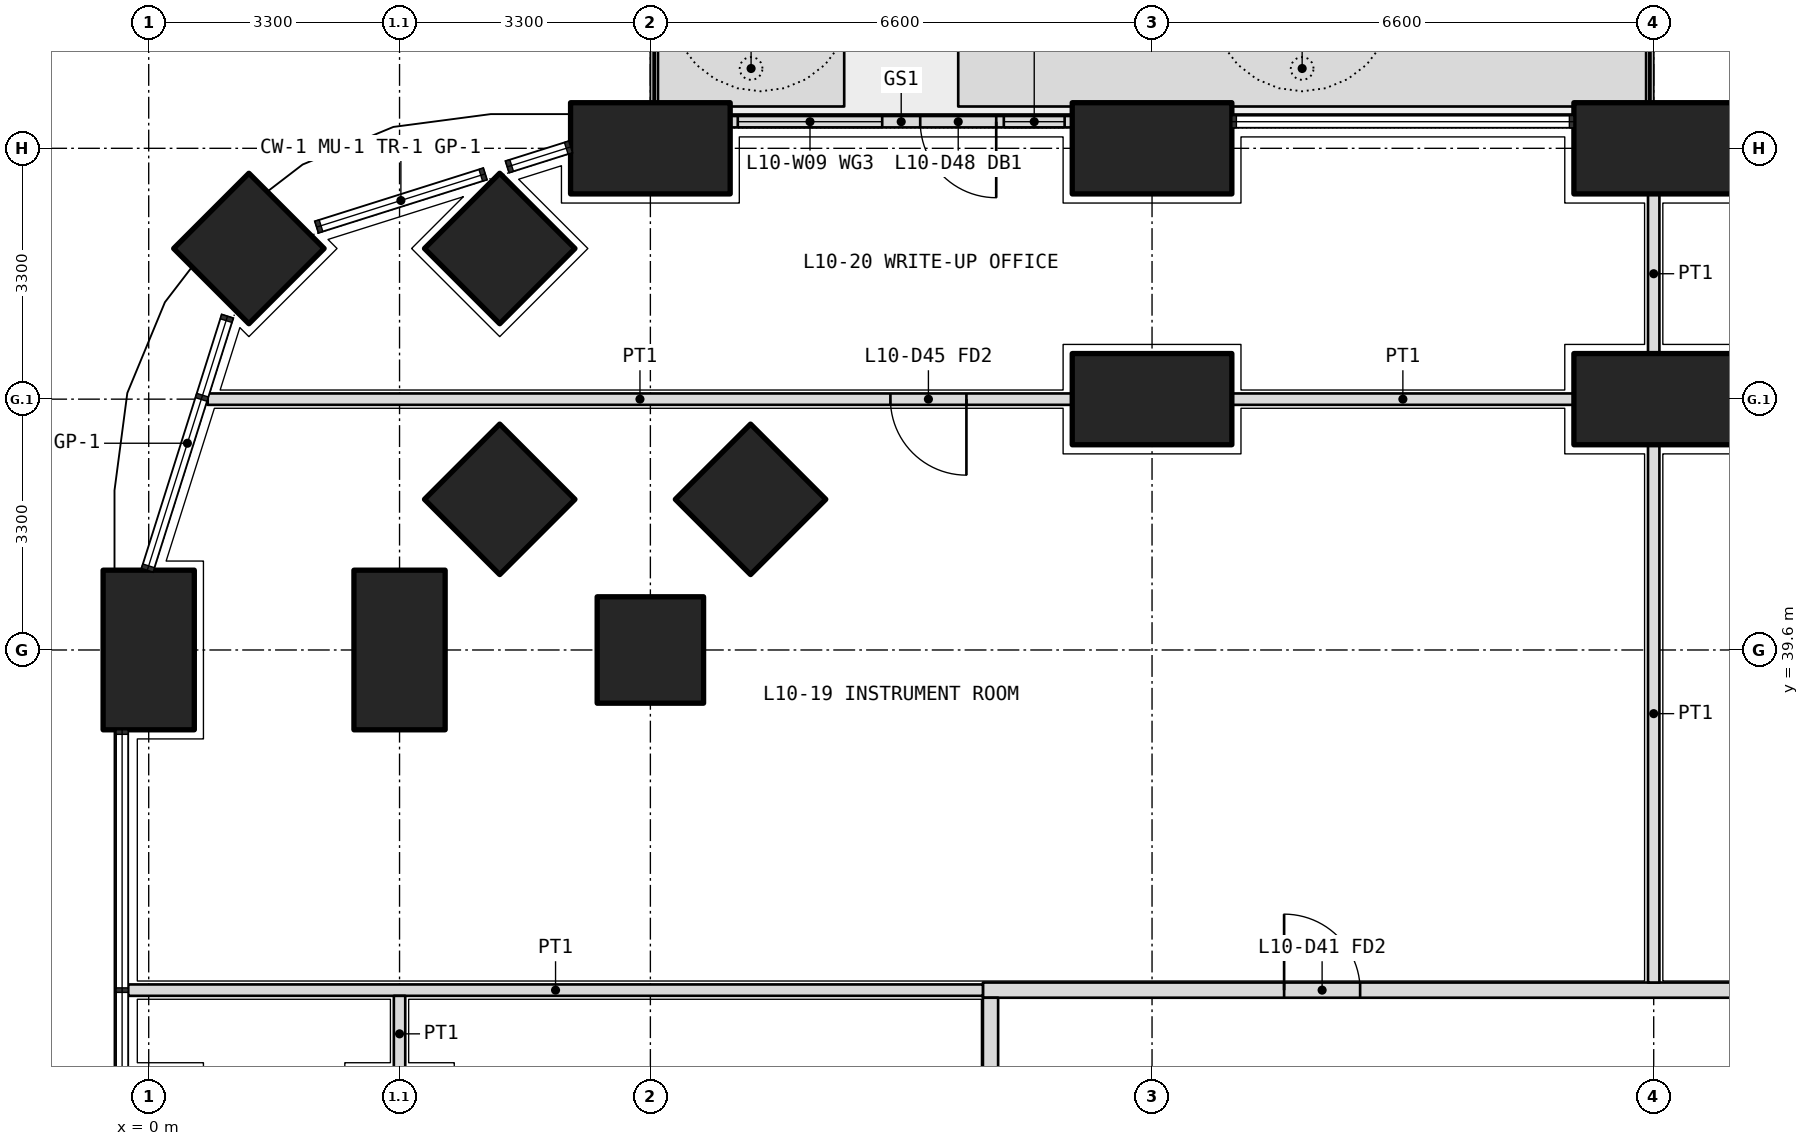
"""IFC4 building model, lengths in metres.
Left out: names, types, materials, properties, quantities, classifications, styles, units other than length and angle.
Written with IfcOpenShell. Run it as: python <this file> out.ifc"""

import sys

from ifc_helpers import new_model, si_unit, direction, frame, frame_2d, origin, origin_2d, place, context, subcontext, project, spatial, polyline, rectangle, outline, extrude, element, fill, save


model = new_model("IFC4")
c1 = context("Model", 3, precision=1e-05, world=origin(), true_north=direction((0.0, 1.0)))
c2 = subcontext(c1, "Body", "Model", "MODEL_VIEW")
j1 = project(units=[si_unit("LENGTHUNIT", "METRE"), si_unit("PLANEANGLEUNIT", "RADIAN")], contexts=[c1])
p1 = place(None, origin())
s1 = spatial("IfcSite", under=j1, at=p1, CompositionType="ELEMENT")
p2 = place(p1, origin())
s2 = spatial("IfcBuilding", under=s1, at=p2, CompositionType="ELEMENT")
p3 = place(p2, frame((0.0, 0.0, 46.5)))
s3 = spatial("IfcBuildingStorey", under=s2, at=p3, CompositionType="ELEMENT", Elevation=46.5)
p4 = place(p3, frame((1.318, 44.882, 0.0), z_axis=(0.0, 0.0, 1.0), x_axis=(0.707106781187, 0.707106781187, 0.0)))
e1 = element("IfcColumn", 1, at=p4, inside=s3, PredefinedType="COLUMN", context=c2, shape_type="SweptSolid", body=[
    extrude(rectangle(XDim=1.4, YDim=1.4, at=origin_2d()), origin(), (0.0, 0.0, 1.0), 4.2),
])
for number, where, z_axis, x_axis in (
    (2, (0.0, 39.6, 0.0), (0.0, 0.0, 1.0), (0.0, 1.0, 0.0)),
    (3, (6.6, 46.2, 0.0), (0.0, 0.0, 1.0), (1.0, 0.0, 0.0)),
    (4, (13.2, 46.2, 0.0), (0.0, 0.0, 1.0), (1.0, 0.0, 0.0)),
    (5, (19.8, 46.2, 0.0), (0.0, 0.0, 1.0), (1.0, 0.0, 0.0)),
):
    element("IfcColumn", number, at=place(p3, frame(where, z_axis=z_axis, x_axis=x_axis)), inside=s3, PredefinedType="COLUMN", context=c2, shape_type="SweptSolid", body=[
        extrude(rectangle(XDim=2.1, YDim=1.2, at=origin_2d()), origin(), (0.0, 0.0, 1.0), 4.2),
    ])
for number, where, z_axis, x_axis in (
    (6, (6.6, 39.6, 0.0), (0.0, 0.0, 1.0), (1.0, 0.0, 0.0)),
    (7, (4.618, 44.882, 0.0), (0.0, 0.0, 1.0), (0.707, 0.707, 0.0)),
):
    element("IfcColumn", number, at=place(p3, frame(where, z_axis=z_axis, x_axis=x_axis)), inside=s3, PredefinedType="COLUMN", context=c2, shape_type="SweptSolid", body=[
        extrude(rectangle(XDim=1.4, YDim=1.4, at=origin_2d()), origin(), (0.0, 0.0, 1.0), 4.2),
    ])
p5 = place(p3, frame((3.3, 39.6, 0.0), z_axis=(0.0, 0.0, 1.0), x_axis=(0.0, 1.0, 0.0)))
e8 = element("IfcColumn", 8, at=p5, inside=s3, PredefinedType="COLUMN", context=c2, shape_type="SweptSolid", body=[
    extrude(rectangle(XDim=2.1, YDim=1.2, at=origin_2d()), origin(), (0.0, 0.0, 1.0), 4.2),
])
p6 = place(p3, frame((4.618, 41.582, 0.0), z_axis=(0.0, 0.0, 1.0), x_axis=(0.707106781187, 0.707106781187, 0.0)))
e9 = element("IfcColumn", 9, at=p6, inside=s3, PredefinedType="COLUMN", context=c2, shape_type="SweptSolid", body=[
    extrude(rectangle(XDim=1.4, YDim=1.4, at=origin_2d()), origin(), (0.0, 0.0, 1.0), 4.2),
])
for number, where, z_axis, x_axis in (
    (10, (13.2, 42.9, 0.0), (0.0, 0.0, 1.0), (1.0, 0.0, 0.0)),
    (11, (19.8, 42.9, 0.0), (0.0, 0.0, 1.0), (1.0, 0.0, 0.0)),
):
    element("IfcColumn", number, at=place(p3, frame(where, z_axis=z_axis, x_axis=x_axis)), inside=s3, PredefinedType="COLUMN", context=c2, shape_type="SweptSolid", body=[
        extrude(rectangle(XDim=2.1, YDim=1.2, at=origin_2d()), origin(), (0.0, 0.0, 1.0), 4.2),
    ])
p7 = place(p3, frame((7.918, 41.582, 0.0), z_axis=(0.0, 0.0, 1.0), x_axis=(0.707106781187, 0.707106781187, 0.0)))
e12 = element("IfcColumn", 12, at=p7, inside=s3, PredefinedType="COLUMN", context=c2, shape_type="SweptSolid", body=[
    extrude(rectangle(XDim=1.4, YDim=1.4, at=origin_2d()), origin(), (0.0, 0.0, 1.0), 4.2),
])
p8 = place(p3, origin())
e13 = element("IfcWall", 13, at=p8, inside=s3, PredefinedType="USERDEFINED", context=c2, shape_type="SweptSolid", body=[
    extrude(outline(polyline([(6.7, 46.75), (9.15, 46.75), (9.15, 47.75), (6.7, 47.75), (6.7, 46.75)]), holes=[polyline([(6.85, 46.9), (9.0, 46.9), (9.0, 47.6), (6.85, 47.6), (6.85, 46.9)])]), origin(), (0.0, 0.0, 1.0), 1.05),
])
p9 = place(p3, origin())
e14 = element("IfcWall", 14, at=p9, inside=s3, PredefinedType="USERDEFINED", context=c2, shape_type="SweptSolid", body=[
    extrude(outline(polyline([(10.65, 46.75), (19.7, 46.75), (19.7, 47.75), (10.65, 47.75), (10.65, 46.75)]), holes=[polyline([(10.8, 46.9), (19.55, 46.9), (19.55, 47.6), (10.8, 47.6), (10.8, 46.9)])]), origin(), (0.0, 0.0, 1.0), 1.05),
])
p10 = place(p3, frame((12.15, 46.55, 0.0), z_axis=(0.0, 0.0, 1.0), x_axis=(-1.0, 0.0, 0.0)))
e15 = element("IfcWall", 15, at=p10, inside=s3, PredefinedType="SOLIDWALL", context=c2, shape_type="SweptSolid", body=[
    extrude(rectangle(XDim=4.5, YDim=0.15, at=frame_2d((2.25, 0.0))), origin(), (0.0, 0.0, 1.0), 2.7),
])
p11 = place(p10, frame((1.0, 0.0, 0.0)))
e16 = element("IfcOpeningElement", 16, at=p11, cuts=e15, PredefinedType="OPENING", context=c2, shape_type="SweptSolid", body=[
    extrude(rectangle(XDim=1.0, YDim=2.4, at=frame_2d((0.5, 1.2))), frame((0.0, 0.085, 0.0), z_axis=(0.0, -1.0, 0.0), x_axis=(1.0, 0.0, 0.0)), (0.0, 0.0, 1.0), 0.17),
])
p12 = place(p10, frame((0.1, 0.0, 0.1)))
e17 = element("IfcOpeningElement", 17, at=p12, cuts=e15, PredefinedType="OPENING", context=c2, shape_type="SweptSolid", body=[
    extrude(rectangle(XDim=0.8, YDim=2.3, at=frame_2d((0.4, 1.15))), frame((0.0, 0.085, 0.0), z_axis=(0.0, -1.0, 0.0), x_axis=(1.0, 0.0, 0.0)), (0.0, 0.0, 1.0), 0.17),
])
p13 = place(p10, frame((2.5, 0.0, 0.1)))
e18 = element("IfcOpeningElement", 18, at=p13, cuts=e15, PredefinedType="OPENING", context=c2, shape_type="SweptSolid", body=[
    extrude(rectangle(XDim=1.9, YDim=2.3, at=frame_2d((0.95, 1.15))), frame((0.0, 0.085, 0.0), z_axis=(0.0, -1.0, 0.0), x_axis=(1.0, 0.0, 0.0)), (0.0, 0.0, 1.0), 0.17),
])
p14 = place(p3, frame((10.975, 35.125, 0.0), z_axis=(0.0, 0.0, 1.0), x_axis=(1.0, 0.0, 0.0)))
e19 = element("IfcWall", 19, at=p14, inside=s3, PredefinedType="PARTITIONING", context=c2, shape_type="SweptSolid", body=[
    extrude(rectangle(XDim=30.85, YDim=0.2, at=frame_2d((15.425, 0.0))), origin(), (0.0, 0.0, 1.0), 2.85),
])
p15 = place(p14, frame((3.962, 0.0, 0.0)))
e20 = element("IfcOpeningElement", 20, at=p15, cuts=e19, PredefinedType="OPENING", context=c2, shape_type="SweptSolid", body=[
    extrude(rectangle(XDim=1.0, YDim=2.1, at=frame_2d((0.5, 1.05))), frame((0.0, 0.11, 0.0), z_axis=(0.0, -1.0, 0.0), x_axis=(1.0, 0.0, 0.0)), (0.0, 0.0, 1.0), 0.22),
])
p16 = place(p14, frame((16.475, 0.0, 0.0)))
e21 = element("IfcOpeningElement", 21, at=p16, cuts=e19, PredefinedType="OPENING", context=c2, shape_type="SweptSolid", body=[
    extrude(rectangle(XDim=1.2, YDim=2.1, at=frame_2d((0.6, 1.05))), frame((0.0, 0.11, 0.0), z_axis=(0.0, -1.0, 0.0), x_axis=(1.0, 0.0, 0.0)), (0.0, 0.0, 1.0), 0.22),
])
p17 = place(p14, frame((27.438, 0.0, 0.0)))
e22 = element("IfcOpeningElement", 22, at=p17, cuts=e19, PredefinedType="OPENING", context=c2, shape_type="SweptSolid", body=[
    extrude(rectangle(XDim=1.2, YDim=2.1, at=frame_2d((0.6, 1.05))), frame((0.0, 0.11, 0.0), z_axis=(0.0, -1.0, 0.0), x_axis=(1.0, 0.0, 0.0)), (0.0, 0.0, 1.0), 0.22),
])
p18 = place(p3, frame((11.075, 29.7, 0.0), z_axis=(0.0, 0.0, 1.0), x_axis=(0.0, 1.0, 0.0)))
e23 = element("IfcWall", 23, at=p18, inside=s3, PredefinedType="PARTITIONING", context=c2, shape_type="SweptSolid", body=[
    extrude(rectangle(XDim=5.325, YDim=0.2, at=frame_2d((2.663, 0.0))), origin(), (0.0, 0.0, 1.0), 2.85),
])
p19 = place(p18, frame((2.212, 0.0, 0.0)))
e24 = element("IfcOpeningElement", 24, at=p19, cuts=e23, PredefinedType="OPENING", context=c2, shape_type="SweptSolid", body=[
    extrude(rectangle(XDim=1.0, YDim=2.1, at=frame_2d((0.5, 1.05))), frame((0.0, 0.11, 0.0), z_axis=(0.0, -1.0, 0.0), x_axis=(1.0, 0.0, 0.0)), (0.0, 0.0, 1.0), 0.22),
])
p20 = place(p3, frame((-0.27, 35.125, 0.0), z_axis=(0.0, 0.0, 1.0), x_axis=(1.0, 0.0, 0.0)))
e25 = element("IfcWall", 25, at=p20, inside=s3, PredefinedType="PARTITIONING", context=c2, shape_type="SweptSolid", body=[
    extrude(rectangle(XDim=11.245, YDim=0.15, at=frame_2d((5.623, 0.0))), origin(), (0.0, 0.0, 1.0), 2.7),
])
p21 = place(p3, frame((18.75, 42.9, 0.0), z_axis=(0.0, 0.0, 1.0), x_axis=(-1.0, 0.0, 0.0)))
e26 = element("IfcWall", 26, at=p21, inside=s3, PredefinedType="PARTITIONING", context=c2, shape_type="SweptSolid", body=[
    extrude(rectangle(XDim=4.5, YDim=0.15, at=frame_2d((2.25, 0.0))), origin(), (0.0, 0.0, 1.0), 3.9),
])
p22 = place(p3, frame((12.15, 42.9, 0.0), z_axis=(0.0, 0.0, 1.0), x_axis=(-1.0, 0.0, 0.0)))
e27 = element("IfcWall", 27, at=p22, inside=s3, PredefinedType="PARTITIONING", context=c2, shape_type="SweptSolid", body=[
    extrude(rectangle(XDim=11.374, YDim=0.15, at=frame_2d((5.687, 0.0))), origin(), (0.0, 0.0, 1.0), 2.7),
])
p23 = place(p22, frame((1.392, 0.0, 0.0)))
e28 = element("IfcOpeningElement", 28, at=p23, cuts=e27, PredefinedType="OPENING", context=c2, shape_type="SweptSolid", body=[
    extrude(rectangle(XDim=1.0, YDim=2.1, at=frame_2d((0.5, 1.05))), frame((0.0, 0.085, 0.0), z_axis=(0.0, -1.0, 0.0), x_axis=(1.0, 0.0, 0.0)), (0.0, 0.0, 1.0), 0.17),
])
p24 = place(p3, frame((19.8, 45.6, 0.0), z_axis=(0.0, 0.0, 1.0), x_axis=(0.0, -1.0, 0.0)))
e29 = element("IfcWall", 29, at=p24, inside=s3, PredefinedType="PARTITIONING", context=c2, shape_type="SweptSolid", body=[
    extrude(rectangle(XDim=2.1, YDim=0.15, at=frame_2d((1.05, 0.0))), origin(), (0.0, 0.0, 1.0), 2.85),
])
p25 = place(p3, frame((19.8, 42.3, 0.0), z_axis=(0.0, 0.0, 1.0), x_axis=(0.0, -1.0, 0.0)))
e30 = element("IfcWall", 30, at=p25, inside=s3, PredefinedType="PARTITIONING", context=c2, shape_type="SweptSolid", body=[
    extrude(rectangle(XDim=7.075, YDim=0.15, at=frame_2d((3.538, 0.0))), origin(), (0.0, 0.0, 1.0), 2.85),
])
p26 = place(p3, frame((3.3, 35.05, 0.0), z_axis=(0.0, 0.0, 1.0), x_axis=(0.0, -1.0, 0.0)))
e31 = element("IfcWall", 31, at=p26, inside=s3, PredefinedType="PARTITIONING", context=c2, shape_type="SweptSolid", body=[
    extrude(rectangle(XDim=1.0, YDim=0.15, at=frame_2d((0.5, 0.0))), origin(), (0.0, 0.0, 1.0), 3.9),
])
p27 = place(p11, origin())
e32 = element("IfcDoor", 32, at=p27, inside=s3, OperationType="SINGLE_SWING_LEFT", PredefinedType="DOOR", context=c2, shape_type="SweptSolid", body=[
    extrude(rectangle(XDim=1.0, YDim=2.4, at=frame_2d((0.5, 1.2))), frame((0.0, 0.025, 0.0), z_axis=(0.0, -1.0, 0.0), x_axis=(1.0, 0.0, 0.0)), (0.0, 0.0, 1.0), 0.05),
])
fill(e16, e32)
p28 = place(p12, origin())
e33 = element("IfcWindow", 33, at=p28, inside=s3, PartitioningType="SINGLE_PANEL", PredefinedType="WINDOW", context=c2, shape_type="SweptSolid", body=[
    extrude(rectangle(XDim=0.8, YDim=2.3, at=frame_2d((0.4, 1.15))), frame((0.0, 0.03, 0.0), z_axis=(0.0, -1.0, 0.0), x_axis=(1.0, 0.0, 0.0)), (0.0, 0.0, 1.0), 0.06),
])
fill(e17, e33)
p29 = place(p13, origin())
e34 = element("IfcWindow", 34, at=p29, inside=s3, PartitioningType="SINGLE_PANEL", PredefinedType="WINDOW", context=c2, shape_type="SweptSolid", body=[
    extrude(rectangle(XDim=1.9, YDim=2.3, at=frame_2d((0.95, 1.15))), frame((0.0, 0.03, 0.0), z_axis=(0.0, -1.0, 0.0), x_axis=(1.0, 0.0, 0.0)), (0.0, 0.0, 1.0), 0.06),
])
fill(e18, e34)
p30 = place(p15, origin())
e35 = element("IfcDoor", 35, at=p30, inside=s3, OperationType="SINGLE_SWING_LEFT", PredefinedType="DOOR", context=c2, shape_type="SweptSolid", body=[
    extrude(rectangle(XDim=1.0, YDim=2.1, at=frame_2d((0.5, 1.05))), frame((0.0, 0.025, 0.0), z_axis=(0.0, -1.0, 0.0), x_axis=(1.0, 0.0, 0.0)), (0.0, 0.0, 1.0), 0.05),
])
fill(e20, e35)
p31 = place(p23, origin())
e36 = element("IfcDoor", 36, at=p31, inside=s3, OperationType="SINGLE_SWING_LEFT", PredefinedType="DOOR", context=c2, shape_type="SweptSolid", body=[
    extrude(rectangle(XDim=1.0, YDim=2.1, at=frame_2d((0.5, 1.05))), frame((0.0, 0.025, 0.0), z_axis=(0.0, -1.0, 0.0), x_axis=(1.0, 0.0, 0.0)), (0.0, 0.0, 1.0), 0.05),
])
fill(e28, e36)
save(model, sys.argv[1])
